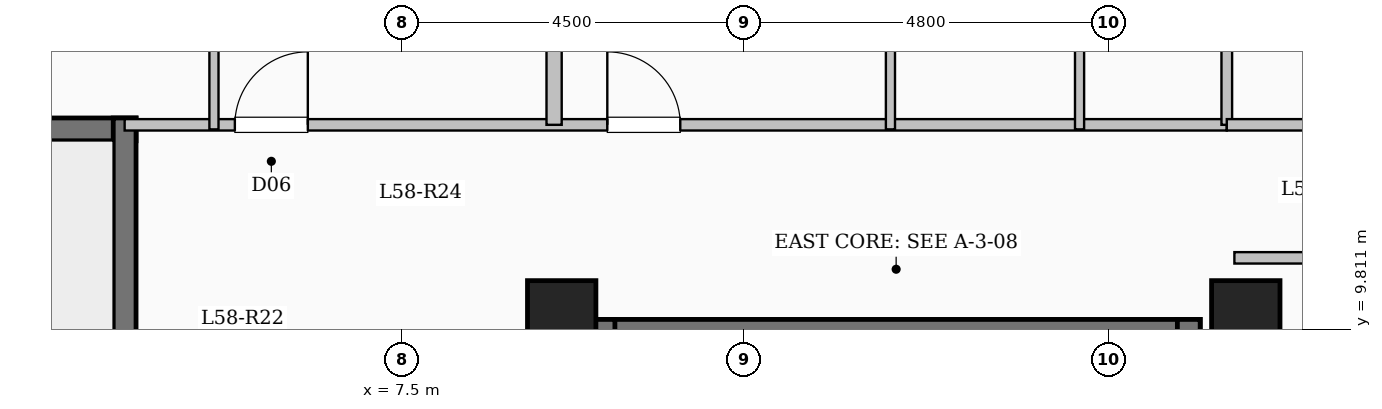
"""IFC4 building model, lengths in metres.
Left out: names, types, materials, properties, quantities, classifications, styles, units other than length and angle.
Written with IfcOpenShell. Run it as: python <this file> out.ifc"""

import sys

from ifc_helpers import new_model, si_unit, direction, frame, frame_2d, origin, origin_2d, place, context, subcontext, project, spatial, rectangle, extrude, element, fill, save


model = new_model("IFC4")
c1 = context("Model", 3, precision=1e-05, world=origin(), true_north=direction((0.0, 1.0)))
c2 = subcontext(c1, "Body", "Model", "MODEL_VIEW")
j1 = project(units=[si_unit("LENGTHUNIT", "METRE"), si_unit("PLANEANGLEUNIT", "RADIAN")], contexts=[c1])
p1 = place(None, origin())
s1 = spatial("IfcSite", under=j1, at=p1, CompositionType="ELEMENT")
p2 = place(p1, origin())
s2 = spatial("IfcBuilding", under=s1, at=p2, CompositionType="ELEMENT")
p3 = place(p2, frame((0.0, 0.0, 213.7)))
s3 = spatial("IfcBuildingStorey", under=s2, at=p3, CompositionType="ELEMENT", Elevation=213.7)
for number, where, z_axis, x_axis in (
    (1, (9.6, 10.0, 0.0), (0.0, 0.0, 1.0), (1.0, 0.0, 0.0)),
    (2, (18.6, 10.0, 0.0), (0.0, 0.0, 1.0), (1.0, 0.0, 0.0)),
):
    element("IfcColumn", number, at=place(p3, frame(where, z_axis=z_axis, x_axis=x_axis)), inside=s3, PredefinedType="COLUMN", context=c2, shape_type="SweptSolid", body=[
        extrude(rectangle(XDim=0.9, YDim=0.9, at=origin_2d()), origin(), (0.0, 0.0, 1.0), 3.35),
    ])
p4 = place(p3, frame((10.0, 9.79, 0.0), z_axis=(0.0, 0.0, 1.0), x_axis=(1.0, 0.0, 0.0)))
e3 = element("IfcWall", 3, at=p4, inside=s3, PredefinedType="SHEAR", context=c2, shape_type="SweptSolid", body=[
    extrude(rectangle(XDim=8.0, YDim=0.3, at=frame_2d((4.0, 0.0))), origin(), (0.0, 0.0, 1.0), 3.35),
])
for number, where, z_axis, x_axis in (
    (4, (10.15, 6.35, 0.0), (0.0, 0.0, 1.0), (0.0, 1.0, 0.0)),
    (5, (17.85, 6.35, 0.0), (0.0, 0.0, 1.0), (0.0, 1.0, 0.0)),
):
    element("IfcWall", number, at=place(p3, frame(where, z_axis=z_axis, x_axis=x_axis)), inside=s3, PredefinedType="SHEAR", context=c2, shape_type="SweptSolid", body=[
        extrude(rectangle(XDim=3.59, YDim=0.3, at=frame_2d((1.795, 0.0))), origin(), (0.0, 0.0, 1.0), 3.35),
    ])
p5 = place(p3, frame((-4.0, 12.44, 0.0), z_axis=(0.0, 0.0, 1.0), x_axis=(1.0, 0.0, 0.0)))
e6 = element("IfcWall", 6, at=p5, inside=s3, PredefinedType="SHEAR", context=c2, shape_type="SweptSolid", body=[
    extrude(rectangle(XDim=8.0, YDim=0.3, at=frame_2d((4.0, 0.0))), origin(), (0.0, 0.0, 1.0), 3.35),
])
p6 = place(p3, frame((3.85, 9.0, 0.0), z_axis=(0.0, 0.0, 1.0), x_axis=(0.0, 1.0, 0.0)))
e7 = element("IfcWall", 7, at=p6, inside=s3, PredefinedType="SHEAR", context=c2, shape_type="SweptSolid", body=[
    extrude(rectangle(XDim=3.59, YDim=0.3, at=frame_2d((1.795, 0.0))), origin(), (0.0, 0.0, 1.0), 3.35),
])
p7 = place(p3, frame((3.85, 12.5, 0.0), z_axis=(0.0, 0.0, 1.0), x_axis=(1.0, 0.0, 0.0)))
e8 = element("IfcWall", 8, at=p7, inside=s3, PredefinedType="PARTITIONING", context=c2, shape_type="SweptSolid", body=[
    extrude(rectangle(XDim=14.5, YDim=0.15, at=frame_2d((7.25, 0.0))), origin(), (0.0, 0.0, 1.0), 3.1),
])
p8 = place(p7, frame((1.45, 0.0, 0.0)))
e9 = element("IfcOpeningElement", 9, at=p8, cuts=e8, PredefinedType="OPENING", context=c2, shape_type="SweptSolid", body=[
    extrude(rectangle(XDim=0.96, YDim=2.15, at=frame_2d((0.48, 1.075))), frame((0.0, 0.085, 0.0), z_axis=(0.0, -1.0, 0.0), x_axis=(1.0, 0.0, 0.0)), (0.0, 0.0, 1.0), 0.17),
])
p9 = place(p7, frame((6.35, 0.0, 0.0)))
e10 = element("IfcOpeningElement", 10, at=p9, cuts=e8, PredefinedType="OPENING", context=c2, shape_type="SweptSolid", body=[
    extrude(rectangle(XDim=0.96, YDim=2.15, at=frame_2d((0.48, 1.075))), frame((0.0, 0.085, 0.0), z_axis=(0.0, -1.0, 0.0), x_axis=(1.0, 0.0, 0.0)), (0.0, 0.0, 1.0), 0.17),
])
p10 = place(p3, frame((9.5, 12.5, 0.0), z_axis=(0.0, 0.0, 1.0), x_axis=(0.0, 1.0, 0.0)))
e11 = element("IfcWall", 11, at=p10, inside=s3, PredefinedType="SOLIDWALL", context=c2, shape_type="SweptSolid", body=[
    extrude(rectangle(XDim=8.77, YDim=0.2, at=frame_2d((4.385, 0.0))), origin(), (0.0, 0.0, 1.0), 3.1),
])
p11 = place(p3, frame((5.025, 12.44, 0.0), z_axis=(0.0, 0.0, 1.0), x_axis=(0.0, 1.0, 0.0)))
e12 = element("IfcWall", 12, at=p11, inside=s3, PredefinedType="PARTITIONING", context=c2, shape_type="SweptSolid", body=[
    extrude(rectangle(XDim=3.21, YDim=0.12, at=frame_2d((1.605, 0.0))), origin(), (0.0, 0.0, 1.0), 3.1),
])
p12 = place(p11, frame((1.195, 0.0, 0.0)))
e13 = element("IfcOpeningElement", 13, at=p12, cuts=e12, PredefinedType="OPENING", context=c2, shape_type="SweptSolid", body=[
    extrude(rectangle(XDim=0.88, YDim=2.1, at=frame_2d((0.44, 1.05))), frame((0.0, 0.07, 0.0), z_axis=(0.0, -1.0, 0.0), x_axis=(1.0, 0.0, 0.0)), (0.0, 0.0, 1.0), 0.14),
])
p13 = place(p3, frame((13.925, 12.44, 0.0), z_axis=(0.0, 0.0, 1.0), x_axis=(0.0, 1.0, 0.0)))
e14 = element("IfcWall", 14, at=p13, inside=s3, PredefinedType="PARTITIONING", context=c2, shape_type="SweptSolid", body=[
    extrude(rectangle(XDim=8.46, YDim=0.12, at=frame_2d((4.23, 0.0))), origin(), (0.0, 0.0, 1.0), 3.1),
])
p14 = place(p13, frame((3.075, 0.0, 0.0)))
e15 = element("IfcOpeningElement", 15, at=p14, cuts=e14, PredefinedType="OPENING", context=c2, shape_type="SweptSolid", body=[
    extrude(rectangle(XDim=1.08, YDim=2.15, at=frame_2d((0.54, 1.075))), frame((0.0, 0.07, 0.0), z_axis=(0.0, -1.0, 0.0), x_axis=(1.0, 0.0, 0.0)), (0.0, 0.0, 1.0), 0.14),
])
p15 = place(p3, frame((16.413, 12.44, 0.0), z_axis=(0.0, 0.0, 1.0), x_axis=(0.0, 1.0, 0.0)))
e16 = element("IfcWall", 16, at=p15, inside=s3, PredefinedType="PARTITIONING", context=c2, shape_type="SweptSolid", body=[
    extrude(rectangle(XDim=2.79, YDim=0.12, at=frame_2d((1.395, 0.0))), origin(), (0.0, 0.0, 1.0), 3.1),
])
p16 = place(p3, frame((18.45, 10.75, 0.0), z_axis=(0.0, 0.0, 1.0), x_axis=(1.0, 0.0, 0.0)))
e17 = element("IfcWall", 17, at=p16, inside=s3, PredefinedType="PARTITIONING", context=c2, shape_type="SweptSolid", body=[
    extrude(rectangle(XDim=5.13, YDim=0.15, at=frame_2d((2.565, 0.0))), origin(), (0.0, 0.0, 1.0), 3.1),
])
p17 = place(p3, frame((18.35, 12.5, 0.0), z_axis=(0.0, 0.0, 1.0), x_axis=(0.0, 1.0, 0.0)))
e18 = element("IfcWall", 18, at=p17, inside=s3, PredefinedType="PARTITIONING", context=c2, shape_type="SweptSolid", body=[
    extrude(rectangle(XDim=4.75, YDim=0.14, at=frame_2d((2.375, 0.0))), origin(), (0.0, 0.0, 1.0), 3.1),
])
p18 = place(p3, frame((18.35, 12.5, 0.0), z_axis=(0.0, 0.0, 1.0), x_axis=(1.0, 0.0, 0.0)))
e19 = element("IfcWall", 19, at=p18, inside=s3, PredefinedType="PARTITIONING", context=c2, shape_type="SweptSolid", body=[
    extrude(rectangle(XDim=5.23, YDim=0.15, at=frame_2d((2.615, 0.0))), origin(), (0.0, 0.0, 1.0), 3.1),
])
p19 = place(p18, frame((2.14, 0.0, 0.0)))
e20 = element("IfcOpeningElement", 20, at=p19, cuts=e19, PredefinedType="OPENING", context=c2, shape_type="SweptSolid", body=[
    extrude(rectangle(XDim=0.95, YDim=2.15, at=frame_2d((0.475, 1.075))), frame((0.0, 0.085, 0.0), z_axis=(0.0, -1.0, 0.0), x_axis=(1.0, 0.0, 0.0)), (0.0, 0.0, 1.0), 0.17),
])
p20 = place(p8, origin())
e21 = element("IfcDoor", 21, at=p20, inside=s3, OperationType="SINGLE_SWING_RIGHT", PredefinedType="DOOR", context=c2, shape_type="SweptSolid", body=[
    extrude(rectangle(XDim=0.96, YDim=2.15, at=frame_2d((0.48, 1.075))), frame((0.0, 0.025, 0.0), z_axis=(0.0, -1.0, 0.0), x_axis=(1.0, 0.0, 0.0)), (0.0, 0.0, 1.0), 0.05),
])
fill(e9, e21)
p21 = place(p9, origin())
e22 = element("IfcDoor", 22, at=p21, inside=s3, OperationType="SINGLE_SWING_LEFT", PredefinedType="DOOR", context=c2, shape_type="SweptSolid", body=[
    extrude(rectangle(XDim=0.96, YDim=2.15, at=frame_2d((0.48, 1.075))), frame((0.0, 0.025, 0.0), z_axis=(0.0, -1.0, 0.0), x_axis=(1.0, 0.0, 0.0)), (0.0, 0.0, 1.0), 0.05),
])
fill(e10, e22)
save(model, sys.argv[1])
